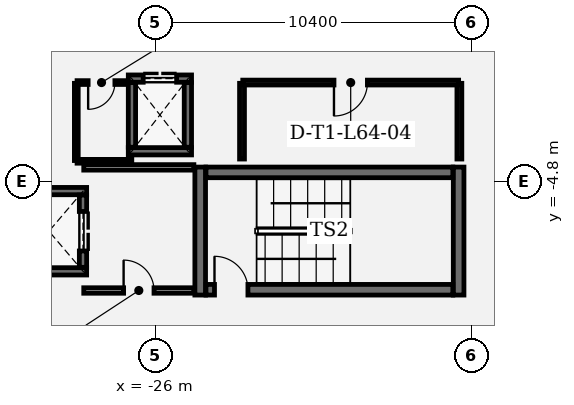
"""IFC4 building model, lengths in metres.
Left out: names, types, materials, properties, quantities, classifications, styles, units other than length and angle.
Written with IfcOpenShell. Run it as: python <this file> out.ifc"""

import sys

from ifc_helpers import new_model, si_unit, direction, frame, frame_2d, origin, place, context, subcontext, project, spatial, rectangle, extrude, element, fill, save


model = new_model("IFC4")
c1 = context("Model", 3, precision=1e-05, world=origin(), true_north=direction((0.0, 1.0)))
c2 = subcontext(c1, "Body", "Model", "MODEL_VIEW")
j1 = project(units=[si_unit("LENGTHUNIT", "METRE"), si_unit("PLANEANGLEUNIT", "RADIAN")], contexts=[c1])
p1 = place(None, origin())
s1 = spatial("IfcSite", under=j1, at=p1, CompositionType="ELEMENT")
p2 = place(p1, origin())
s2 = spatial("IfcBuilding", under=s1, at=p2, CompositionType="ELEMENT")
p3 = place(p2, frame((0.0, 0.0, 276.6)))
s3 = spatial("IfcBuildingStorey", under=s2, at=p3, CompositionType="ELEMENT", Elevation=276.6)
for number, where, z_axis, x_axis in (
    (1, (-24.525, -4.34, 0.0), (0.0, 0.0, 1.0), (0.0, -1.0, 0.0)),
    (2, (-16.025, -8.55, 0.0), (0.0, 0.0, 1.0), (0.0, 1.0, 0.0)),
):
    element("IfcWall", number, at=place(p3, frame(where, z_axis=z_axis, x_axis=x_axis)), inside=s3, PredefinedType="SHEAR", context=c2, shape_type="SweptSolid", body=[
        extrude(rectangle(XDim=4.21, YDim=0.35, at=frame_2d((2.105, 0.0))), origin(), (0.0, 0.0, 1.0), 3.91),
    ])
p4 = place(p3, frame((-24.335, -8.375, 0.0), z_axis=(0.0, 0.0, 1.0), x_axis=(1.0, 0.0, 0.0)))
e3 = element("IfcWall", 3, at=p4, inside=s3, PredefinedType="SHEAR", context=c2, shape_type="SweptSolid", body=[
    extrude(rectangle(XDim=8.12, YDim=0.35, at=frame_2d((4.06, 0.0))), origin(), (0.0, 0.0, 1.0), 3.91),
])
p5 = place(p4, frame((0.28, 0.0, 0.0)))
e4 = element("IfcOpeningElement", 4, at=p5, cuts=e3, PredefinedType="OPENING", context=c2, shape_type="SweptSolid", body=[
    extrude(rectangle(XDim=1.1, YDim=2.2, at=frame_2d((0.55, 1.1))), frame((0.0, 0.185, 0.0), z_axis=(0.0, -1.0, 0.0), x_axis=(1.0, 0.0, 0.0)), (0.0, 0.0, 1.0), 0.37),
])
p6 = place(p3, frame((-16.215, -4.515, 0.0), z_axis=(0.0, 0.0, 1.0), x_axis=(-1.0, 0.0, 0.0)))
e5 = element("IfcWall", 5, at=p6, inside=s3, PredefinedType="SHEAR", context=c2, shape_type="SweptSolid", body=[
    extrude(rectangle(XDim=8.12, YDim=0.35, at=frame_2d((4.06, 0.0))), origin(), (0.0, 0.0, 1.0), 3.91),
])
for number, where, z_axis, x_axis in (
    (6, (-28.26, -7.77, 0.0), (0.0, 0.0, 1.0), (-1.0, 0.0, 0.0)),
    (7, (-30.74, -5.13, 0.0), (0.0, 0.0, 1.0), (1.0, 0.0, 0.0)),
):
    element("IfcWall", number, at=place(p3, frame(where, z_axis=z_axis, x_axis=x_axis)), inside=s3, PredefinedType="SHEAR", context=c2, shape_type="SweptSolid", body=[
        extrude(rectangle(XDim=2.48, YDim=0.24, at=frame_2d((1.24, 0.0))), origin(), (0.0, 0.0, 1.0), 3.91),
    ])
p7 = place(p3, frame((-28.38, -5.262, 0.0), z_axis=(0.0, 0.0, 1.0), x_axis=(0.0, -1.0, 0.0)))
e8 = element("IfcWall", 8, at=p7, inside=s3, PredefinedType="SHEAR", context=c2, shape_type="SweptSolid", body=[
    extrude(rectangle(XDim=2.376, YDim=0.24, at=frame_2d((1.188, 0.0))), origin(), (0.0, 0.0, 1.0), 3.91),
])
p8 = place(p7, frame((0.538, 0.0, 0.0)))
e9 = element("IfcOpeningElement", 9, at=p8, cuts=e8, PredefinedType="OPENING", context=c2, shape_type="SweptSolid", body=[
    extrude(rectangle(XDim=1.3, YDim=2.3, at=frame_2d((0.65, 1.15))), frame((0.0, 0.13, 0.0), z_axis=(0.0, -1.0, 0.0), x_axis=(1.0, 0.0, 0.0)), (0.0, 0.0, 1.0), 0.26),
])
p9 = place(p3, frame((-24.81, -3.82, 0.0), z_axis=(0.0, 0.0, 1.0), x_axis=(-1.0, 0.0, 0.0)))
e10 = element("IfcWall", 10, at=p9, inside=s3, PredefinedType="SHEAR", context=c2, shape_type="SweptSolid", body=[
    extrude(rectangle(XDim=2.08, YDim=0.24, at=frame_2d((1.04, 0.0))), origin(), (0.0, 0.0, 1.0), 3.91),
])
p10 = place(p3, frame((-26.89, -1.43, 0.0), z_axis=(0.0, 0.0, 1.0), x_axis=(1.0, 0.0, 0.0)))
e11 = element("IfcWall", 11, at=p10, inside=s3, PredefinedType="SHEAR", context=c2, shape_type="SweptSolid", body=[
    extrude(rectangle(XDim=2.08, YDim=0.24, at=frame_2d((1.04, 0.0))), origin(), (0.0, 0.0, 1.0), 3.91),
])
p11 = place(p10, frame((0.49, 0.0, 0.0)))
e12 = element("IfcOpeningElement", 12, at=p11, cuts=e11, PredefinedType="OPENING", context=c2, shape_type="SweptSolid", body=[
    extrude(rectangle(XDim=1.1, YDim=2.2, at=frame_2d((0.55, 1.1))), frame((0.0, 0.13, 0.0), z_axis=(0.0, -1.0, 0.0), x_axis=(1.0, 0.0, 0.0)), (0.0, 0.0, 1.0), 0.26),
])
for number, where, z_axis, x_axis in (
    (13, (-26.77, -3.688, 0.0), (0.0, 0.0, 1.0), (0.0, 1.0, 0.0)),
    (14, (-24.93, -1.562, 0.0), (0.0, 0.0, 1.0), (0.0, -1.0, 0.0)),
):
    element("IfcWall", number, at=place(p3, frame(where, z_axis=z_axis, x_axis=x_axis)), inside=s3, PredefinedType="SHEAR", context=c2, shape_type="SweptSolid", body=[
        extrude(rectangle(XDim=2.126, YDim=0.24, at=frame_2d((1.063, 0.0))), origin(), (0.0, 0.0, 1.0), 3.91),
    ])
p12 = place(p3, frame((-28.355, -8.4, 0.0), z_axis=(0.0, 0.0, 1.0), x_axis=(1.0, 0.0, 0.0)))
e15 = element("IfcWall", 15, at=p12, inside=s3, PredefinedType="PARTITIONING", context=c2, shape_type="SweptSolid", body=[
    extrude(rectangle(XDim=3.622, YDim=0.18, at=frame_2d((1.811, 0.0))), origin(), (0.0, 0.0, 1.0), 3.529),
])
p13 = place(p12, frame((1.311, 0.0, 0.0)))
e16 = element("IfcOpeningElement", 16, at=p13, cuts=e15, PredefinedType="OPENING", context=c2, shape_type="SweptSolid", body=[
    extrude(rectangle(XDim=1.0, YDim=2.15, at=frame_2d((0.5, 1.075))), frame((0.0, 0.1, 0.0), z_axis=(0.0, -1.0, 0.0), x_axis=(1.0, 0.0, 0.0)), (0.0, 0.0, 1.0), 0.2),
])
p14 = place(p3, frame((-24.733, -4.35, 0.0), z_axis=(0.0, 0.0, 1.0), x_axis=(-1.0, 0.0, 0.0)))
e17 = element("IfcWall", 17, at=p14, inside=s3, PredefinedType="PARTITIONING", context=c2, shape_type="SweptSolid", body=[
    extrude(rectangle(XDim=3.622, YDim=0.18, at=frame_2d((1.811, 0.0))), origin(), (0.0, 0.0, 1.0), 3.91),
])
for number, where, z_axis, x_axis in (
    (18, (-23.15, -1.585, 0.0), (0.0, 0.0, 1.0), (0.0, -1.0, 0.0)),
    (19, (-16.0, -4.075, 0.0), (0.0, 0.0, 1.0), (0.0, 1.0, 0.0)),
):
    element("IfcWall", number, at=place(p3, frame(where, z_axis=z_axis, x_axis=x_axis)), inside=s3, PredefinedType="PARTITIONING", context=c2, shape_type="SweptSolid", body=[
        extrude(rectangle(XDim=2.49, YDim=0.16, at=frame_2d((1.245, 0.0))), origin(), (0.0, 0.0, 1.0), 3.91),
    ])
p15 = place(p3, frame((-16.025, -1.56, 0.0), z_axis=(0.0, 0.0, 1.0), x_axis=(-1.0, 0.0, 0.0)))
e20 = element("IfcWall", 20, at=p15, inside=s3, PredefinedType="PARTITIONING", context=c2, shape_type="SweptSolid", body=[
    extrude(rectangle(XDim=7.1, YDim=0.16, at=frame_2d((3.55, 0.0))), origin(), (0.0, 0.0, 1.0), 3.91),
])
p16 = place(p15, frame((3.0, 0.0, 0.0)))
e21 = element("IfcOpeningElement", 21, at=p16, cuts=e20, PredefinedType="OPENING", context=c2, shape_type="SweptSolid", body=[
    extrude(rectangle(XDim=1.1, YDim=2.15, at=frame_2d((0.55, 1.075))), frame((0.0, 0.09, 0.0), z_axis=(0.0, -1.0, 0.0), x_axis=(1.0, 0.0, 0.0)), (0.0, 0.0, 1.0), 0.18),
])
p17 = place(p3, frame((-28.6, -1.585, 0.0), z_axis=(0.0, 0.0, 1.0), x_axis=(0.0, -1.0, 0.0)))
e22 = element("IfcWall", 22, at=p17, inside=s3, PredefinedType="PARTITIONING", context=c2, shape_type="SweptSolid", body=[
    extrude(rectangle(XDim=2.54, YDim=0.125, at=frame_2d((1.27, 0.0))), origin(), (0.0, 0.0, 1.0), 3.91),
])
p18 = place(p3, frame((-28.575, -4.15, 0.0), z_axis=(0.0, 0.0, 1.0), x_axis=(1.0, 0.0, 0.0)))
e23 = element("IfcWall", 23, at=p18, inside=s3, PredefinedType="PARTITIONING", context=c2, shape_type="SweptSolid", body=[
    extrude(rectangle(XDim=1.8, YDim=0.125, at=frame_2d((0.9, 0.0))), origin(), (0.0, 0.0, 1.0), 3.91),
])
p19 = place(p3, frame((-26.966, -1.56, 0.0), z_axis=(0.0, 0.0, 1.0), x_axis=(-1.0, 0.0, 0.0)))
e24 = element("IfcWall", 24, at=p19, inside=s3, PredefinedType="PARTITIONING", context=c2, shape_type="SweptSolid", body=[
    extrude(rectangle(XDim=1.609, YDim=0.125, at=frame_2d((0.805, 0.0))), origin(), (0.0, 0.0, 1.0), 3.91),
])
p20 = place(p19, frame((0.365, 0.0, 0.0)))
e25 = element("IfcOpeningElement", 25, at=p20, cuts=e24, PredefinedType="OPENING", context=c2, shape_type="SweptSolid", body=[
    extrude(rectangle(XDim=0.88, YDim=2.1, at=frame_2d((0.44, 1.05))), frame((0.0, 0.073, 0.0), z_axis=(0.0, -1.0, 0.0), x_axis=(1.0, 0.0, 0.0)), (0.0, 0.0, 1.0), 0.145),
])
p21 = place(p5, origin())
e26 = element("IfcDoor", 26, at=p21, inside=s3, OperationType="SINGLE_SWING_LEFT", PredefinedType="DOOR", context=c2, shape_type="SweptSolid", body=[
    extrude(rectangle(XDim=1.1, YDim=2.2, at=frame_2d((0.55, 1.1))), frame((0.0, 0.025, 0.0), z_axis=(0.0, -1.0, 0.0), x_axis=(1.0, 0.0, 0.0)), (0.0, 0.0, 1.0), 0.05),
])
fill(e4, e26)
p22 = place(p8, origin())
e27 = element("IfcDoor", 27, at=p22, inside=s3, OperationType="DOUBLE_DOOR_SLIDING", PredefinedType="DOOR", context=c2, shape_type="SweptSolid", body=[
    extrude(rectangle(XDim=1.3, YDim=2.3, at=frame_2d((0.65, 1.15))), frame((0.0, 0.025, 0.0), z_axis=(0.0, -1.0, 0.0), x_axis=(1.0, 0.0, 0.0)), (0.0, 0.0, 1.0), 0.05),
])
fill(e9, e27)
p23 = place(p11, origin())
e28 = element("IfcDoor", 28, at=p23, inside=s3, OperationType="DOUBLE_DOOR_SLIDING", PredefinedType="DOOR", context=c2, shape_type="SweptSolid", body=[
    extrude(rectangle(XDim=1.1, YDim=2.2, at=frame_2d((0.55, 1.1))), frame((0.0, 0.025, 0.0), z_axis=(0.0, -1.0, 0.0), x_axis=(1.0, 0.0, 0.0)), (0.0, 0.0, 1.0), 0.05),
])
fill(e12, e28)
p24 = place(p16, origin())
e29 = element("IfcDoor", 29, at=p24, inside=s3, OperationType="SINGLE_SWING_RIGHT", PredefinedType="DOOR", context=c2, shape_type="SweptSolid", body=[
    extrude(rectangle(XDim=1.1, YDim=2.15, at=frame_2d((0.55, 1.075))), frame((0.0, 0.025, 0.0), z_axis=(0.0, -1.0, 0.0), x_axis=(1.0, 0.0, 0.0)), (0.0, 0.0, 1.0), 0.05),
])
fill(e21, e29)
p25 = place(p20, origin())
e30 = element("IfcDoor", 30, at=p25, inside=s3, OperationType="SINGLE_SWING_RIGHT", PredefinedType="DOOR", context=c2, shape_type="SweptSolid", body=[
    extrude(rectangle(XDim=0.88, YDim=2.1, at=frame_2d((0.44, 1.05))), frame((0.0, 0.025, 0.0), z_axis=(0.0, -1.0, 0.0), x_axis=(1.0, 0.0, 0.0)), (0.0, 0.0, 1.0), 0.05),
])
fill(e25, e30)
p26 = place(p13, origin())
e31 = element("IfcDoor", 31, at=p26, inside=s3, OperationType="SINGLE_SWING_LEFT", PredefinedType="DOOR", context=c2, shape_type="SweptSolid", body=[
    extrude(rectangle(XDim=1.0, YDim=2.15, at=frame_2d((0.5, 1.075))), frame((0.0, 0.025, 0.0), z_axis=(0.0, -1.0, 0.0), x_axis=(1.0, 0.0, 0.0)), (0.0, 0.0, 1.0), 0.05),
])
fill(e16, e31)
save(model, sys.argv[1])
